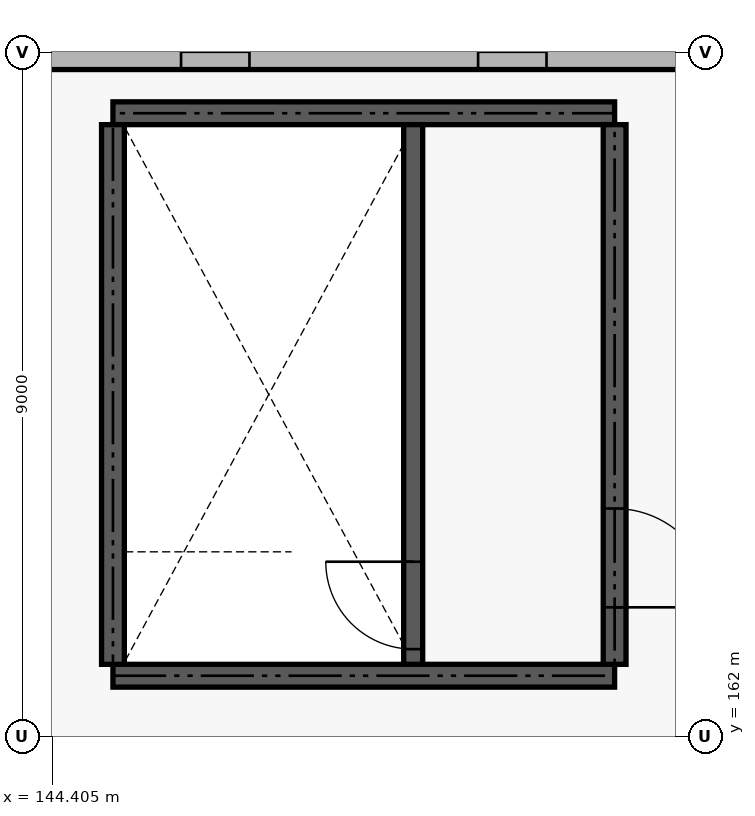
"""IFC4 building model, lengths in metres.
Left out: names, types, materials, properties, quantities, classifications, styles, units other than length and angle.
Written with IfcOpenShell. Run it as: python <this file> out.ifc"""

import sys

from ifc_helpers import new_model, si_unit, direction, frame, frame_2d, origin, place, context, subcontext, project, spatial, rectangle, extrude, element, fill, save


model = new_model("IFC4")
c1 = context("Model", 3, precision=1e-05, world=origin(), true_north=direction((0.0, 1.0)))
c2 = subcontext(c1, "Body", "Model", "MODEL_VIEW")
j1 = project(units=[si_unit("LENGTHUNIT", "METRE"), si_unit("PLANEANGLEUNIT", "RADIAN")], contexts=[c1])
p1 = place(None, origin())
s1 = spatial("IfcSite", under=j1, at=p1, CompositionType="ELEMENT")
p2 = place(p1, origin())
s2 = spatial("IfcBuilding", under=s1, at=p2, CompositionType="ELEMENT")
p3 = place(p2, frame((0.0, 0.0, 9.6)))
s3 = spatial("IfcBuildingStorey", under=s2, at=p3, CompositionType="ELEMENT", Elevation=9.6)
p4 = place(p3, frame((144.06, 171.0, 0.0), z_axis=(0.0, 0.0, 1.0), x_axis=(1.0, 0.0, 0.0)))
e1 = element("IfcWall", 1, at=p4, inside=s3, PredefinedType="SOLIDWALL", context=c2, shape_type="SweptSolid", body=[
    extrude(rectangle(XDim=8.88, YDim=0.45, at=frame_2d((4.44, 0.0))), origin(), (0.0, 0.0, 1.0), 3.15),
])
p5 = place(p4, frame((2.036, 0.0, 0.9)))
e2 = element("IfcOpeningElement", 2, at=p5, cuts=e1, PredefinedType="OPENING", context=c2, shape_type="SweptSolid", body=[
    extrude(rectangle(XDim=0.9, YDim=1.2, at=frame_2d((0.45, 0.6))), frame((0.0, 0.235, 0.0), z_axis=(0.0, -1.0, 0.0), x_axis=(1.0, 0.0, 0.0)), (0.0, 0.0, 1.0), 0.47),
])
p6 = place(p4, frame((5.944, 0.0, 0.9)))
e3 = element("IfcOpeningElement", 3, at=p6, cuts=e1, PredefinedType="OPENING", context=c2, shape_type="SweptSolid", body=[
    extrude(rectangle(XDim=0.9, YDim=1.2, at=frame_2d((0.45, 0.6))), frame((0.0, 0.235, 0.0), z_axis=(0.0, -1.0, 0.0), x_axis=(1.0, 0.0, 0.0)), (0.0, 0.0, 1.0), 0.47),
])
for number, where, z_axis, x_axis in (
    (4, (145.2, 162.8, 0.0), (0.0, 0.0, 1.0), (1.0, 0.0, 0.0)),
    (5, (145.2, 170.2, 0.0), (0.0, 0.0, 1.0), (1.0, 0.0, 0.0)),
):
    element("IfcWall", number, at=place(p3, frame(where, z_axis=z_axis, x_axis=x_axis)), inside=s3, PredefinedType="SHEAR", context=c2, shape_type="SweptSolid", body=[
        extrude(rectangle(XDim=6.6, YDim=0.3, at=frame_2d((3.3, 0.0))), origin(), (0.0, 0.0, 1.0), 3.7),
    ])
p7 = place(p3, frame((145.2, 162.95, 0.0), z_axis=(0.0, 0.0, 1.0), x_axis=(0.0, 1.0, 0.0)))
e6 = element("IfcWall", 6, at=p7, inside=s3, PredefinedType="SHEAR", context=c2, shape_type="SweptSolid", body=[
    extrude(rectangle(XDim=7.1, YDim=0.3, at=frame_2d((3.55, 0.0))), origin(), (0.0, 0.0, 1.0), 3.7),
])
p8 = place(p3, frame((151.8, 162.95, 0.0), z_axis=(0.0, 0.0, 1.0), x_axis=(0.0, 1.0, 0.0)))
e7 = element("IfcWall", 7, at=p8, inside=s3, PredefinedType="SHEAR", context=c2, shape_type="SweptSolid", body=[
    extrude(rectangle(XDim=7.1, YDim=0.3, at=frame_2d((3.55, 0.0))), origin(), (0.0, 0.0, 1.0), 3.7),
])
p9 = place(p8, frame((0.75, 0.0, 0.0)))
e8 = element("IfcOpeningElement", 8, at=p9, cuts=e7, PredefinedType="OPENING", context=c2, shape_type="SweptSolid", body=[
    extrude(rectangle(XDim=1.3, YDim=2.15, at=frame_2d((0.65, 1.075))), frame((0.0, 0.16, 0.0), z_axis=(0.0, -1.0, 0.0), x_axis=(1.0, 0.0, 0.0)), (0.0, 0.0, 1.0), 0.32),
])
p10 = place(p3, frame((149.15, 162.95, 0.0), z_axis=(0.0, 0.0, 1.0), x_axis=(0.0, 1.0, 0.0)))
e9 = element("IfcWall", 9, at=p10, inside=s3, PredefinedType="SHEAR", context=c2, shape_type="SweptSolid", body=[
    extrude(rectangle(XDim=7.1, YDim=0.25, at=frame_2d((3.55, 0.0))), origin(), (0.0, 0.0, 1.0), 3.7),
])
p11 = place(p10, frame((0.2, 0.0, 0.0)))
e10 = element("IfcOpeningElement", 10, at=p11, cuts=e9, PredefinedType="OPENING", context=c2, shape_type="SweptSolid", body=[
    extrude(rectangle(XDim=1.15, YDim=2.15, at=frame_2d((0.575, 1.075))), frame((0.0, 0.135, 0.0), z_axis=(0.0, -1.0, 0.0), x_axis=(1.0, 0.0, 0.0)), (0.0, 0.0, 1.0), 0.27),
])
p12 = place(p5, origin())
e11 = element("IfcWindow", 11, at=p12, inside=s3, PartitioningType="SINGLE_PANEL", PredefinedType="WINDOW", context=c2, shape_type="SweptSolid", body=[
    extrude(rectangle(XDim=0.9, YDim=1.2, at=frame_2d((0.45, 0.6))), frame((0.0, 0.03, 0.0), z_axis=(0.0, -1.0, 0.0), x_axis=(1.0, 0.0, 0.0)), (0.0, 0.0, 1.0), 0.06),
])
fill(e2, e11)
p13 = place(p6, origin())
e12 = element("IfcWindow", 12, at=p13, inside=s3, PartitioningType="SINGLE_PANEL", PredefinedType="WINDOW", context=c2, shape_type="SweptSolid", body=[
    extrude(rectangle(XDim=0.9, YDim=1.2, at=frame_2d((0.45, 0.6))), frame((0.0, 0.03, 0.0), z_axis=(0.0, -1.0, 0.0), x_axis=(1.0, 0.0, 0.0)), (0.0, 0.0, 1.0), 0.06),
])
fill(e3, e12)
p14 = place(p9, frame((1.3, 0.0, 0.0), z_axis=(0.0, 0.0, 1.0), x_axis=(-1.0, 0.0, 0.0)))
e13 = element("IfcDoor", 13, at=p14, inside=s3, OperationType="DOUBLE_DOOR_SINGLE_SWING", PredefinedType="DOOR", context=c2, shape_type="SweptSolid", body=[
    extrude(rectangle(XDim=1.3, YDim=2.15, at=frame_2d((0.65, 1.075))), frame((0.0, 0.025, 0.0), z_axis=(0.0, -1.0, 0.0), x_axis=(1.0, 0.0, 0.0)), (0.0, 0.0, 1.0), 0.05),
])
fill(e8, e13)
p15 = place(p11, frame((1.15, 0.0, 0.0), z_axis=(0.0, 0.0, 1.0), x_axis=(-1.0, 0.0, 0.0)))
e14 = element("IfcDoor", 14, at=p15, inside=s3, OperationType="SINGLE_SWING_RIGHT", PredefinedType="DOOR", context=c2, shape_type="SweptSolid", body=[
    extrude(rectangle(XDim=1.15, YDim=2.15, at=frame_2d((0.575, 1.075))), frame((0.0, 0.025, 0.0), z_axis=(0.0, -1.0, 0.0), x_axis=(1.0, 0.0, 0.0)), (0.0, 0.0, 1.0), 0.05),
])
fill(e10, e14)
save(model, sys.argv[1])
